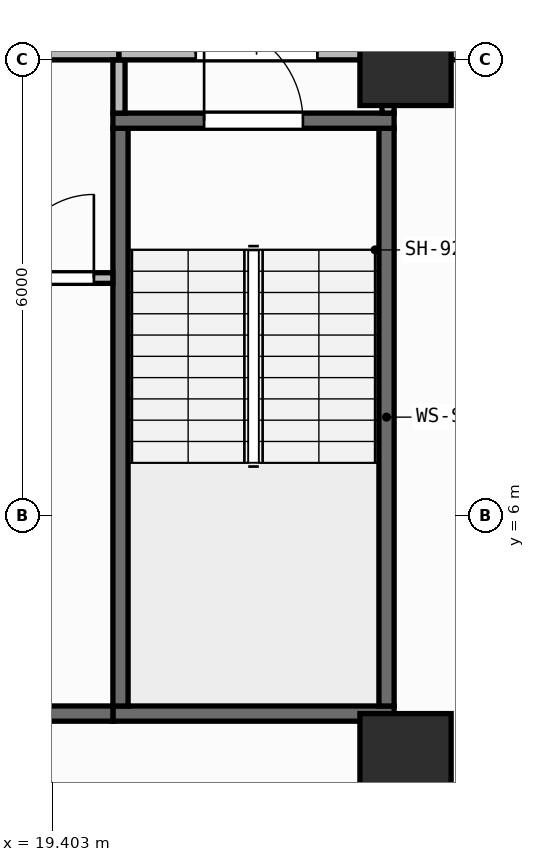
"""IFC4 building model, lengths in metres.
Left out: names, types, materials, properties, quantities, classifications, styles, units other than length and angle.
Written with IfcOpenShell. Run it as: python <this file> out.ifc"""

import sys

from ifc_helpers import new_model, si_unit, direction, frame, frame_2d, origin, origin_2d, place, context, subcontext, project, spatial, rectangle, extrude, element, fill, save


model = new_model("IFC4")
c1 = context("Model", 3, precision=1e-05, world=origin(), true_north=direction((0.0, 1.0)))
c2 = subcontext(c1, "Body", "Model", "MODEL_VIEW")
j1 = project(units=[si_unit("LENGTHUNIT", "METRE"), si_unit("PLANEANGLEUNIT", "RADIAN")], contexts=[c1])
p1 = place(None, origin())
s1 = spatial("IfcSite", under=j1, at=p1, CompositionType="ELEMENT")
p2 = place(p1, origin())
s2 = spatial("IfcBuilding", under=s1, at=p2, CompositionType="ELEMENT")
p3 = place(p2, frame((0.0, 0.0, 154.7)))
s3 = spatial("IfcBuildingStorey", under=s2, at=p3, CompositionType="ELEMENT", Elevation=154.7)
for number, where, z_axis, x_axis in (
    (1, (24.05, 2.8, 0.0), (0.0, 0.0, 1.0), (1.0, 0.0, 0.0)),
    (2, (24.05, 12.0, 0.0), (0.0, 0.0, 1.0), (1.0, 0.0, 0.0)),
):
    element("IfcColumn", number, at=place(p3, frame(where, z_axis=z_axis, x_axis=x_axis)), inside=s3, PredefinedType="COLUMN", context=c2, shape_type="SweptSolid", body=[
        extrude(rectangle(XDim=1.2, YDim=1.2, at=origin_2d()), origin(), (0.0, 0.0, 1.0), 3.95),
    ])
p4 = place(p3, frame((2.76, 0.173, 0.0), z_axis=(0.0, 0.0, 1.0), x_axis=(0.996857931723, 0.079210251617, 0.0)))
e3 = element("IfcWall", 3, at=p4, inside=s3, PredefinedType="STANDARD", context=c2, shape_type="SweptSolid", body=[
    extrude(rectangle(XDim=51.442, YDim=0.26, at=frame_2d((25.721, 0.0))), origin(), (0.0, 0.0, 1.0), 3.71),
])
p5 = place(p4, frame((24.521, 0.0, 0.9)))
e4 = element("IfcOpeningElement", 4, at=p5, cuts=e3, PredefinedType="OPENING", context=c2, shape_type="SweptSolid", body=[
    extrude(rectangle(XDim=2.4, YDim=1.65, at=frame_2d((1.2, 0.825))), frame((0.0, 0.14, 0.0), z_axis=(0.0, -1.0, 0.0), x_axis=(1.0, 0.0, 0.0)), (0.0, 0.0, 1.0), 0.28),
])
p6 = place(p3, frame((20.2, 3.4, 0.0), z_axis=(0.0, 0.0, 1.0), x_axis=(1.0, 0.0, 0.0)))
e5 = element("IfcWall", 5, at=p6, inside=s3, PredefinedType="SHEAR", context=c2, shape_type="SweptSolid", body=[
    extrude(rectangle(XDim=3.7, YDim=0.2, at=frame_2d((1.85, 0.0))), origin(), (0.0, 0.0, 1.0), 3.71),
])
for number, where, z_axis, x_axis in (
    (6, (20.3, 3.5, 0.0), (0.0, 0.0, 1.0), (0.0, 1.0, 0.0)),
    (7, (23.8, 3.5, 0.0), (0.0, 0.0, 1.0), (0.0, 1.0, 0.0)),
):
    element("IfcWall", number, at=place(p3, frame(where, z_axis=z_axis, x_axis=x_axis)), inside=s3, PredefinedType="SHEAR", context=c2, shape_type="SweptSolid", body=[
        extrude(rectangle(XDim=7.6, YDim=0.2, at=frame_2d((3.8, 0.0))), origin(), (0.0, 0.0, 1.0), 3.71),
    ])
p7 = place(p3, frame((20.2, 11.2, 0.0), z_axis=(0.0, 0.0, 1.0), x_axis=(1.0, 0.0, 0.0)))
e8 = element("IfcWall", 8, at=p7, inside=s3, PredefinedType="SHEAR", context=c2, shape_type="SweptSolid", body=[
    extrude(rectangle(XDim=3.7, YDim=0.2, at=frame_2d((1.85, 0.0))), origin(), (0.0, 0.0, 1.0), 3.71),
])
p8 = place(p7, frame((1.2, 0.0, 0.0)))
e9 = element("IfcOpeningElement", 9, at=p8, cuts=e8, PredefinedType="OPENING", context=c2, shape_type="SweptSolid", body=[
    extrude(rectangle(XDim=1.3, YDim=2.15, at=frame_2d((0.65, 1.075))), frame((0.0, 0.11, 0.0), z_axis=(0.0, -1.0, 0.0), x_axis=(1.0, 0.0, 0.0)), (0.0, 0.0, 1.0), 0.22),
])
p9 = place(p3, frame((6.5, 3.4, 0.0), z_axis=(0.0, 0.0, 1.0), x_axis=(1.0, 0.0, 0.0)))
e10 = element("IfcWall", 10, at=p9, inside=s3, PredefinedType="SHEAR", context=c2, shape_type="SweptSolid", body=[
    extrude(rectangle(XDim=13.7, YDim=0.2, at=frame_2d((6.85, 0.0))), origin(), (0.0, 0.0, 1.0), 3.71),
])
p10 = place(p3, frame((18.61, 9.13, 0.0), z_axis=(0.0, 0.0, 1.0), x_axis=(1.0, 0.0, 0.0)))
e11 = element("IfcWall", 11, at=p10, inside=s3, PredefinedType="PARTITIONING", context=c2, shape_type="SweptSolid", body=[
    extrude(rectangle(XDim=1.59, YDim=0.14, at=frame_2d((0.795, 0.0))), origin(), (0.0, 0.0, 1.0), 3.71),
])
p11 = place(p10, frame((0.24, 0.0, 0.0)))
e12 = element("IfcOpeningElement", 12, at=p11, cuts=e11, PredefinedType="OPENING", context=c2, shape_type="SweptSolid", body=[
    extrude(rectangle(XDim=1.1, YDim=2.1, at=frame_2d((0.55, 1.05))), frame((0.0, 0.08, 0.0), z_axis=(0.0, -1.0, 0.0), x_axis=(1.0, 0.0, 0.0)), (0.0, 0.0, 1.0), 0.16),
])
p12 = place(p3, frame((12.58, 12.08, 0.0), z_axis=(0.0, 0.0, 1.0), x_axis=(1.0, 0.0, 0.0)))
e13 = element("IfcWall", 13, at=p12, inside=s3, PredefinedType="PARTITIONING", context=c2, shape_type="SweptSolid", body=[
    extrude(rectangle(XDim=7.7, YDim=0.16, at=frame_2d((3.85, 0.0))), origin(), (0.0, 0.0, 1.0), 3.083),
])
p13 = place(p12, frame((3.05, 0.0, 0.0)))
e14 = element("IfcOpeningElement", 14, at=p13, cuts=e13, PredefinedType="OPENING", context=c2, shape_type="SweptSolid", body=[
    extrude(rectangle(XDim=1.6, YDim=2.05, at=frame_2d((0.8, 1.025))), frame((0.0, 0.09, 0.0), z_axis=(0.0, -1.0, 0.0), x_axis=(1.0, 0.0, 0.0)), (0.0, 0.0, 1.0), 0.18),
])
p14 = place(p3, frame((20.28, 11.3, 0.0), z_axis=(0.0, 0.0, 1.0), x_axis=(0.0, 1.0, 0.0)))
e15 = element("IfcWall", 15, at=p14, inside=s3, PredefinedType="PARTITIONING", context=c2, shape_type="SweptSolid", body=[
    extrude(rectangle(XDim=0.7, YDim=0.16, at=frame_2d((0.35, 0.0))), origin(), (0.0, 0.0, 1.0), 3.71),
])
p15 = place(p3, frame((20.28, 12.08, 0.0), z_axis=(0.0, 0.0, 1.0), x_axis=(1.0, 0.0, 0.0)))
e16 = element("IfcWall", 16, at=p15, inside=s3, PredefinedType="PARTITIONING", context=c2, shape_type="SweptSolid", body=[
    extrude(rectangle(XDim=3.62, YDim=0.16, at=frame_2d((1.81, 0.0))), origin(), (0.0, 0.0, 1.0), 3.083),
])
p16 = place(p15, frame((1.01, 0.0, 0.0)))
e17 = element("IfcOpeningElement", 17, at=p16, cuts=e16, PredefinedType="OPENING", context=c2, shape_type="SweptSolid", body=[
    extrude(rectangle(XDim=1.6, YDim=2.05, at=frame_2d((0.8, 1.025))), frame((0.0, 0.09, 0.0), z_axis=(0.0, -1.0, 0.0), x_axis=(1.0, 0.0, 0.0)), (0.0, 0.0, 1.0), 0.18),
])
p17 = place(p3, frame((23.82, 11.3, 0.0), z_axis=(0.0, 0.0, 1.0), x_axis=(0.0, 1.0, 0.0)))
e18 = element("IfcWall", 18, at=p17, inside=s3, PredefinedType="PARTITIONING", context=c2, shape_type="SweptSolid", body=[
    extrude(rectangle(XDim=0.7, YDim=0.16, at=frame_2d((0.35, 0.0))), origin(), (0.0, 0.0, 1.0), 3.71),
])
p18 = place(p3, frame((24.02, 12.08, 0.0), z_axis=(0.0, 0.0, 1.0), x_axis=(1.0, 0.0, 0.0)))
e19 = element("IfcWall", 19, at=p18, inside=s3, PredefinedType="PARTITIONING", context=c2, shape_type="SweptSolid", body=[
    extrude(rectangle(XDim=1.244, YDim=0.16, at=frame_2d((0.622, 0.0))), origin(), (0.0, 0.0, 1.0), 3.083),
])
p19 = place(p8, origin())
e20 = element("IfcDoor", 20, at=p19, inside=s3, OperationType="SINGLE_SWING_LEFT", PredefinedType="DOOR", context=c2, shape_type="SweptSolid", body=[
    extrude(rectangle(XDim=1.3, YDim=2.15, at=frame_2d((0.65, 1.075))), frame((0.0, 0.025, 0.0), z_axis=(0.0, -1.0, 0.0), x_axis=(1.0, 0.0, 0.0)), (0.0, 0.0, 1.0), 0.05),
])
fill(e9, e20)
p20 = place(p11, origin())
e21 = element("IfcDoor", 21, at=p20, inside=s3, OperationType="SINGLE_SWING_RIGHT", PredefinedType="DOOR", context=c2, shape_type="SweptSolid", body=[
    extrude(rectangle(XDim=1.1, YDim=2.1, at=frame_2d((0.55, 1.05))), frame((0.0, 0.025, 0.0), z_axis=(0.0, -1.0, 0.0), x_axis=(1.0, 0.0, 0.0)), (0.0, 0.0, 1.0), 0.05),
])
fill(e12, e21)
p21 = place(p16, origin())
e22 = element("IfcDoor", 22, at=p21, inside=s3, OperationType="DOUBLE_DOOR_SINGLE_SWING", PredefinedType="DOOR", context=c2, shape_type="SweptSolid", body=[
    extrude(rectangle(XDim=1.6, YDim=2.05, at=frame_2d((0.8, 1.025))), frame((0.0, 0.025, 0.0), z_axis=(0.0, -1.0, 0.0), x_axis=(1.0, 0.0, 0.0)), (0.0, 0.0, 1.0), 0.05),
])
fill(e17, e22)
save(model, sys.argv[1])
